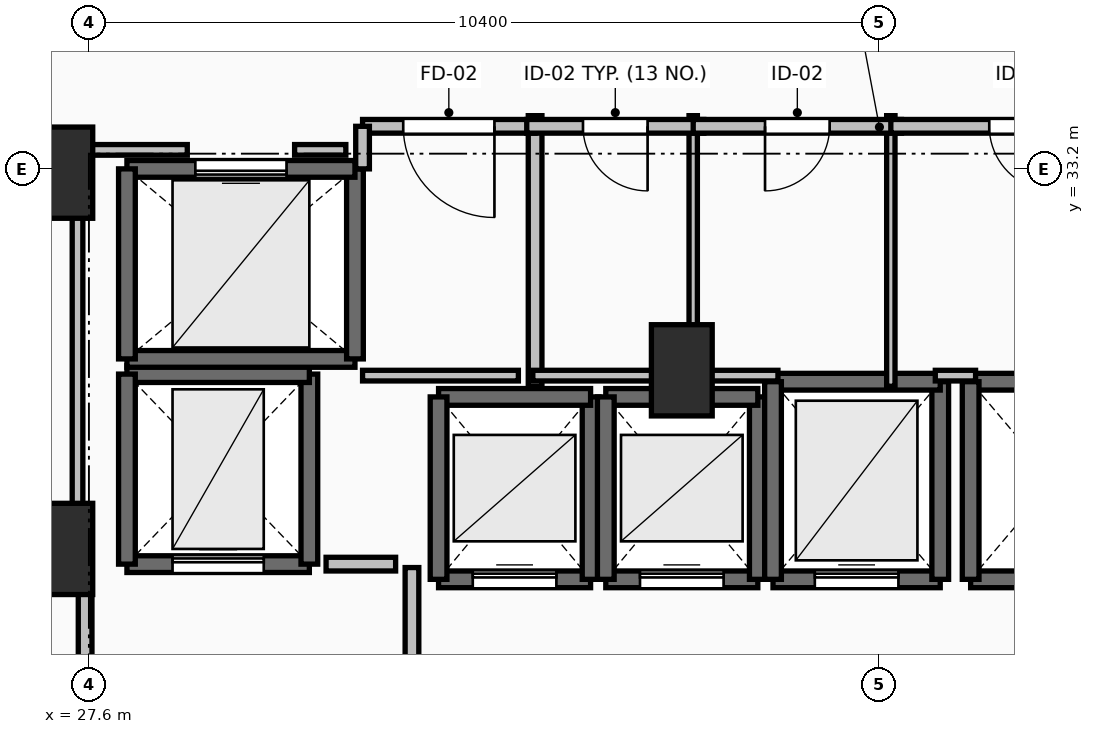
"""IFC4 building model, lengths in metres.
Left out: names, types, materials, properties, quantities, classifications, styles, units other than length and angle.
Written with IfcOpenShell. Run it as: python <this file> out.ifc"""

import sys

from ifc_helpers import new_model, si_unit, direction, frame, frame_2d, origin, origin_2d, place, context, subcontext, project, spatial, rectangle, extrude, element, fill, save


model = new_model("IFC4")
c1 = context("Model", 3, precision=1e-05, world=origin(), true_north=direction((0.0, 1.0)))
c2 = subcontext(c1, "Body", "Model", "MODEL_VIEW")
j1 = project(units=[si_unit("LENGTHUNIT", "METRE"), si_unit("PLANEANGLEUNIT", "RADIAN")], contexts=[c1])
p1 = place(None, origin())
s1 = spatial("IfcSite", under=j1, at=p1, CompositionType="ELEMENT")
p2 = place(p1, origin())
s2 = spatial("IfcBuilding", under=s1, at=p2, CompositionType="ELEMENT")
p3 = place(p2, frame((0.0, 0.0, 45.0)))
s3 = spatial("IfcBuildingStorey", under=s2, at=p3, CompositionType="ELEMENT", Elevation=45.0)
for number, where, z_axis, x_axis in (
    (1, (27.25, 28.2, 0.0), (0.0, 0.0, 1.0), (1.0, 0.0, 0.0)),
    (2, (27.25, 33.15, 0.0), (0.0, 0.0, 1.0), (1.0, 0.0, 0.0)),
    (3, (35.4, 30.55, 0.0), (0.0, 0.0, 1.0), (1.0, 0.0, 0.0)),
):
    element("IfcColumn", number, at=place(p3, frame(where, z_axis=z_axis, x_axis=x_axis)), inside=s3, PredefinedType="PILASTER", context=c2, shape_type="SweptSolid", body=[
        extrude(rectangle(XDim=0.8, YDim=1.2, at=origin_2d()), origin(), (0.0, 0.0, 1.0), 3.5),
    ])
p4 = place(p3, frame((32.2, 27.8, 0.0), z_axis=(0.0, 0.0, 1.0), x_axis=(1.0, 0.0, 0.0)))
e4 = element("IfcWall", 4, at=p4, inside=s3, PredefinedType="SOLIDWALL", context=c2, shape_type="SweptSolid", body=[
    extrude(rectangle(XDim=2.0, YDim=0.22, at=frame_2d((1.0, 0.0))), origin(), (0.0, 0.0, 1.0), 3.24),
])
p5 = place(p4, frame((0.45, 0.0, 0.0)))
e5 = element("IfcOpeningElement", 5, at=p5, cuts=e4, PredefinedType="OPENING", context=c2, shape_type="SweptSolid", body=[
    extrude(rectangle(XDim=1.1, YDim=2.2, at=frame_2d((0.55, 1.1))), frame((0.0, 0.125, 0.0), z_axis=(0.0, -1.0, 0.0), x_axis=(1.0, 0.0, 0.0)), (0.0, 0.0, 1.0), 0.25),
])
p6 = place(p3, frame((34.2, 27.8, 0.0), z_axis=(0.0, 0.0, 1.0), x_axis=(0.0, 1.0, 0.0)))
e6 = element("IfcWall", 6, at=p6, inside=s3, PredefinedType="SOLIDWALL", context=c2, shape_type="SweptSolid", body=[
    extrude(rectangle(XDim=2.4, YDim=0.22, at=frame_2d((1.2, 0.0))), origin(), (0.0, 0.0, 1.0), 3.24),
])
p7 = place(p3, frame((34.2, 30.2, 0.0), z_axis=(0.0, 0.0, 1.0), x_axis=(-1.0, 0.0, 0.0)))
e7 = element("IfcWall", 7, at=p7, inside=s3, PredefinedType="SOLIDWALL", context=c2, shape_type="SweptSolid", body=[
    extrude(rectangle(XDim=2.0, YDim=0.22, at=frame_2d((1.0, 0.0))), origin(), (0.0, 0.0, 1.0), 3.24),
])
p8 = place(p3, frame((32.2, 30.2, 0.0), z_axis=(0.0, 0.0, 1.0), x_axis=(0.0, -1.0, 0.0)))
e8 = element("IfcWall", 8, at=p8, inside=s3, PredefinedType="SOLIDWALL", context=c2, shape_type="SweptSolid", body=[
    extrude(rectangle(XDim=2.4, YDim=0.22, at=frame_2d((1.2, 0.0))), origin(), (0.0, 0.0, 1.0), 3.24),
])
p9 = place(p3, frame((34.4, 27.8, 0.0), z_axis=(0.0, 0.0, 1.0), x_axis=(1.0, 0.0, 0.0)))
e9 = element("IfcWall", 9, at=p9, inside=s3, PredefinedType="SOLIDWALL", context=c2, shape_type="SweptSolid", body=[
    extrude(rectangle(XDim=2.0, YDim=0.22, at=frame_2d((1.0, 0.0))), origin(), (0.0, 0.0, 1.0), 3.24),
])
p10 = place(p9, frame((0.45, 0.0, 0.0)))
e10 = element("IfcOpeningElement", 10, at=p10, cuts=e9, PredefinedType="OPENING", context=c2, shape_type="SweptSolid", body=[
    extrude(rectangle(XDim=1.1, YDim=2.2, at=frame_2d((0.55, 1.1))), frame((0.0, 0.125, 0.0), z_axis=(0.0, -1.0, 0.0), x_axis=(1.0, 0.0, 0.0)), (0.0, 0.0, 1.0), 0.25),
])
p11 = place(p3, frame((36.4, 27.8, 0.0), z_axis=(0.0, 0.0, 1.0), x_axis=(0.0, 1.0, 0.0)))
e11 = element("IfcWall", 11, at=p11, inside=s3, PredefinedType="SOLIDWALL", context=c2, shape_type="SweptSolid", body=[
    extrude(rectangle(XDim=2.4, YDim=0.22, at=frame_2d((1.2, 0.0))), origin(), (0.0, 0.0, 1.0), 3.24),
])
p12 = place(p3, frame((36.4, 30.2, 0.0), z_axis=(0.0, 0.0, 1.0), x_axis=(-1.0, 0.0, 0.0)))
e12 = element("IfcWall", 12, at=p12, inside=s3, PredefinedType="SOLIDWALL", context=c2, shape_type="SweptSolid", body=[
    extrude(rectangle(XDim=2.0, YDim=0.22, at=frame_2d((1.0, 0.0))), origin(), (0.0, 0.0, 1.0), 3.24),
])
p13 = place(p3, frame((34.4, 30.2, 0.0), z_axis=(0.0, 0.0, 1.0), x_axis=(0.0, -1.0, 0.0)))
e13 = element("IfcWall", 13, at=p13, inside=s3, PredefinedType="SOLIDWALL", context=c2, shape_type="SweptSolid", body=[
    extrude(rectangle(XDim=2.4, YDim=0.22, at=frame_2d((1.2, 0.0))), origin(), (0.0, 0.0, 1.0), 3.24),
])
p14 = place(p3, frame((36.6, 27.8, 0.0), z_axis=(0.0, 0.0, 1.0), x_axis=(1.0, 0.0, 0.0)))
e14 = element("IfcWall", 14, at=p14, inside=s3, PredefinedType="SOLIDWALL", context=c2, shape_type="SweptSolid", body=[
    extrude(rectangle(XDim=2.2, YDim=0.22, at=frame_2d((1.1, 0.0))), origin(), (0.0, 0.0, 1.0), 3.24),
])
p15 = place(p14, frame((0.55, 0.0, 0.0)))
e15 = element("IfcOpeningElement", 15, at=p15, cuts=e14, PredefinedType="OPENING", context=c2, shape_type="SweptSolid", body=[
    extrude(rectangle(XDim=1.1, YDim=2.2, at=frame_2d((0.55, 1.1))), frame((0.0, 0.125, 0.0), z_axis=(0.0, -1.0, 0.0), x_axis=(1.0, 0.0, 0.0)), (0.0, 0.0, 1.0), 0.25),
])
p16 = place(p3, frame((38.8, 27.8, 0.0), z_axis=(0.0, 0.0, 1.0), x_axis=(0.0, 1.0, 0.0)))
e16 = element("IfcWall", 16, at=p16, inside=s3, PredefinedType="SOLIDWALL", context=c2, shape_type="SweptSolid", body=[
    extrude(rectangle(XDim=2.6, YDim=0.22, at=frame_2d((1.3, 0.0))), origin(), (0.0, 0.0, 1.0), 3.24),
])
p17 = place(p3, frame((38.8, 30.4, 0.0), z_axis=(0.0, 0.0, 1.0), x_axis=(-1.0, 0.0, 0.0)))
e17 = element("IfcWall", 17, at=p17, inside=s3, PredefinedType="SOLIDWALL", context=c2, shape_type="SweptSolid", body=[
    extrude(rectangle(XDim=2.2, YDim=0.22, at=frame_2d((1.1, 0.0))), origin(), (0.0, 0.0, 1.0), 3.24),
])
p18 = place(p3, frame((36.6, 30.4, 0.0), z_axis=(0.0, 0.0, 1.0), x_axis=(0.0, -1.0, 0.0)))
e18 = element("IfcWall", 18, at=p18, inside=s3, PredefinedType="SOLIDWALL", context=c2, shape_type="SweptSolid", body=[
    extrude(rectangle(XDim=2.6, YDim=0.22, at=frame_2d((1.3, 0.0))), origin(), (0.0, 0.0, 1.0), 3.24),
])
for number, where, z_axis, x_axis in (
    (19, (39.2, 27.8, 0.0), (0.0, 0.0, 1.0), (1.0, 0.0, 0.0)),
    (20, (41.4, 30.4, 0.0), (0.0, 0.0, 1.0), (-1.0, 0.0, 0.0)),
):
    element("IfcWall", number, at=place(p3, frame(where, z_axis=z_axis, x_axis=x_axis)), inside=s3, PredefinedType="SOLIDWALL", context=c2, shape_type="SweptSolid", body=[
        extrude(rectangle(XDim=2.2, YDim=0.22, at=frame_2d((1.1, 0.0))), origin(), (0.0, 0.0, 1.0), 3.24),
    ])
p19 = place(p3, frame((39.2, 30.4, 0.0), z_axis=(0.0, 0.0, 1.0), x_axis=(0.0, -1.0, 0.0)))
e21 = element("IfcWall", 21, at=p19, inside=s3, PredefinedType="SOLIDWALL", context=c2, shape_type="SweptSolid", body=[
    extrude(rectangle(XDim=2.6, YDim=0.22, at=frame_2d((1.3, 0.0))), origin(), (0.0, 0.0, 1.0), 3.24),
])
p20 = place(p3, frame((28.1, 28.0, 0.0), z_axis=(0.0, 0.0, 1.0), x_axis=(1.0, 0.0, 0.0)))
e22 = element("IfcWall", 22, at=p20, inside=s3, PredefinedType="SHEAR", context=c2, shape_type="SweptSolid", body=[
    extrude(rectangle(XDim=2.4, YDim=0.22, at=frame_2d((1.2, 0.0))), origin(), (0.0, 0.0, 1.0), 3.24),
])
p21 = place(p20, frame((0.6, 0.0, 0.0)))
e23 = element("IfcOpeningElement", 23, at=p21, cuts=e22, PredefinedType="OPENING", context=c2, shape_type="SweptSolid", body=[
    extrude(rectangle(XDim=1.2, YDim=2.2, at=frame_2d((0.6, 1.1))), frame((0.0, 0.125, 0.0), z_axis=(0.0, -1.0, 0.0), x_axis=(1.0, 0.0, 0.0)), (0.0, 0.0, 1.0), 0.25),
])
p22 = place(p3, frame((30.5, 28.0, 0.0), z_axis=(0.0, 0.0, 1.0), x_axis=(0.0, 1.0, 0.0)))
e24 = element("IfcWall", 24, at=p22, inside=s3, PredefinedType="SHEAR", context=c2, shape_type="SweptSolid", body=[
    extrude(rectangle(XDim=2.5, YDim=0.22, at=frame_2d((1.25, 0.0))), origin(), (0.0, 0.0, 1.0), 3.24),
])
p23 = place(p3, frame((30.5, 30.5, 0.0), z_axis=(0.0, 0.0, 1.0), x_axis=(-1.0, 0.0, 0.0)))
e25 = element("IfcWall", 25, at=p23, inside=s3, PredefinedType="SHEAR", context=c2, shape_type="SweptSolid", body=[
    extrude(rectangle(XDim=2.4, YDim=0.22, at=frame_2d((1.2, 0.0))), origin(), (0.0, 0.0, 1.0), 3.24),
])
p24 = place(p3, frame((28.1, 30.5, 0.0), z_axis=(0.0, 0.0, 1.0), x_axis=(0.0, -1.0, 0.0)))
e26 = element("IfcWall", 26, at=p24, inside=s3, PredefinedType="SHEAR", context=c2, shape_type="SweptSolid", body=[
    extrude(rectangle(XDim=2.5, YDim=0.22, at=frame_2d((1.25, 0.0))), origin(), (0.0, 0.0, 1.0), 3.24),
])
p25 = place(p3, frame((28.1, 30.7, 0.0), z_axis=(0.0, 0.0, 1.0), x_axis=(1.0, 0.0, 0.0)))
e27 = element("IfcWall", 27, at=p25, inside=s3, PredefinedType="SOLIDWALL", context=c2, shape_type="SweptSolid", body=[
    extrude(rectangle(XDim=3.0, YDim=0.22, at=frame_2d((1.5, 0.0))), origin(), (0.0, 0.0, 1.0), 3.24),
])
p26 = place(p3, frame((31.1, 30.7, 0.0), z_axis=(0.0, 0.0, 1.0), x_axis=(0.0, 1.0, 0.0)))
e28 = element("IfcWall", 28, at=p26, inside=s3, PredefinedType="SOLIDWALL", context=c2, shape_type="SweptSolid", body=[
    extrude(rectangle(XDim=2.5, YDim=0.22, at=frame_2d((1.25, 0.0))), origin(), (0.0, 0.0, 1.0), 3.24),
])
p27 = place(p3, frame((31.1, 33.2, 0.0), z_axis=(0.0, 0.0, 1.0), x_axis=(-1.0, 0.0, 0.0)))
e29 = element("IfcWall", 29, at=p27, inside=s3, PredefinedType="SOLIDWALL", context=c2, shape_type="SweptSolid", body=[
    extrude(rectangle(XDim=3.0, YDim=0.22, at=frame_2d((1.5, 0.0))), origin(), (0.0, 0.0, 1.0), 3.24),
])
p28 = place(p27, frame((0.9, 0.0, 0.0)))
e30 = element("IfcOpeningElement", 30, at=p28, cuts=e29, PredefinedType="OPENING", context=c2, shape_type="SweptSolid", body=[
    extrude(rectangle(XDim=1.2, YDim=2.2, at=frame_2d((0.6, 1.1))), frame((0.0, 0.125, 0.0), z_axis=(0.0, -1.0, 0.0), x_axis=(1.0, 0.0, 0.0)), (0.0, 0.0, 1.0), 0.25),
])
p29 = place(p3, frame((28.1, 33.2, 0.0), z_axis=(0.0, 0.0, 1.0), x_axis=(0.0, -1.0, 0.0)))
e31 = element("IfcWall", 31, at=p29, inside=s3, PredefinedType="SOLIDWALL", context=c2, shape_type="SweptSolid", body=[
    extrude(rectangle(XDim=2.5, YDim=0.22, at=frame_2d((1.25, 0.0))), origin(), (0.0, 0.0, 1.0), 3.24),
])
p30 = place(p3, frame((31.85, 24.045, 0.0), z_axis=(0.0, 0.0, 1.0), x_axis=(0.0, 1.0, 0.0)))
e32 = element("IfcWall", 32, at=p30, inside=s3, PredefinedType="PARTITIONING", context=c2, shape_type="SweptSolid", body=[
    extrude(rectangle(XDim=3.91, YDim=0.18, at=frame_2d((1.955, 0.0))), origin(), (0.0, 0.0, 1.0), 3.24),
])
p31 = place(p30, frame((1.355, 0.0, 0.0)))
e33 = element("IfcOpeningElement", 33, at=p31, cuts=e32, PredefinedType="OPENING", context=c2, shape_type="SweptSolid", body=[
    extrude(rectangle(XDim=1.2, YDim=2.15, at=frame_2d((0.6, 1.075))), frame((0.0, 0.105, 0.0), z_axis=(0.0, -1.0, 0.0), x_axis=(1.0, 0.0, 0.0)), (0.0, 0.0, 1.0), 0.21),
])
p32 = place(p3, frame((27.55, 28.0, 0.0), z_axis=(0.0, 0.0, 1.0), x_axis=(0.0, -1.0, 0.0)))
e34 = element("IfcWall", 34, at=p32, inside=s3, PredefinedType="PARTITIONING", context=c2, shape_type="SweptSolid", body=[
    extrude(rectangle(XDim=4.05, YDim=0.18, at=frame_2d((2.025, 0.0))), origin(), (0.0, 0.0, 1.0), 3.24),
])
p33 = place(p32, frame((1.425, 0.0, 0.0)))
e35 = element("IfcOpeningElement", 35, at=p33, cuts=e34, PredefinedType="OPENING", context=c2, shape_type="SweptSolid", body=[
    extrude(rectangle(XDim=1.2, YDim=2.15, at=frame_2d((0.6, 1.075))), frame((0.0, 0.105, 0.0), z_axis=(0.0, -1.0, 0.0), x_axis=(1.0, 0.0, 0.0)), (0.0, 0.0, 1.0), 0.21),
])
p34 = place(p3, frame((33.47, 30.34, 0.0), z_axis=(0.0, 0.0, 1.0), x_axis=(0.0, 1.0, 0.0)))
e36 = element("IfcWall", 36, at=p34, inside=s3, PredefinedType="PARTITIONING", context=c2, shape_type="SweptSolid", body=[
    extrude(rectangle(XDim=3.56, YDim=0.18, at=frame_2d((1.78, 0.0))), origin(), (0.0, 0.0, 1.0), 3.24),
])
p35 = place(p3, frame((33.47, 33.76, 0.0), z_axis=(0.0, 0.0, 1.0), x_axis=(-1.0, 0.0, 0.0)))
e37 = element("IfcWall", 37, at=p35, inside=s3, PredefinedType="PARTITIONING", context=c2, shape_type="SweptSolid", body=[
    extrude(rectangle(XDim=2.27, YDim=0.18, at=frame_2d((1.135, 0.0))), origin(), (0.0, 0.0, 1.0), 3.24),
])
p36 = place(p35, frame((0.535, 0.0, 0.0)))
e38 = element("IfcOpeningElement", 38, at=p36, cuts=e37, PredefinedType="OPENING", context=c2, shape_type="SweptSolid", body=[
    extrude(rectangle(XDim=1.2, YDim=2.15, at=frame_2d((0.6, 1.075))), frame((0.0, 0.105, 0.0), z_axis=(0.0, -1.0, 0.0), x_axis=(1.0, 0.0, 0.0)), (0.0, 0.0, 1.0), 0.21),
])
p37 = place(p3, frame((31.2, 33.76, 0.0), z_axis=(0.0, 0.0, 1.0), x_axis=(0.0, -1.0, 0.0)))
e39 = element("IfcWall", 39, at=p37, inside=s3, PredefinedType="PARTITIONING", context=c2, shape_type="SweptSolid", body=[
    extrude(rectangle(XDim=0.56, YDim=0.18, at=frame_2d((0.28, 0.0))), origin(), (0.0, 0.0, 1.0), 3.24),
])
p38 = place(p3, frame((35.55, 30.34, 0.0), z_axis=(0.0, 0.0, 1.0), x_axis=(0.0, 1.0, 0.0)))
e40 = element("IfcWall", 40, at=p38, inside=s3, PredefinedType="PARTITIONING", context=c2, shape_type="SweptSolid", body=[
    extrude(rectangle(XDim=3.56, YDim=0.11, at=frame_2d((1.78, 0.0))), origin(), (0.0, 0.0, 1.0), 2.432),
])
p39 = place(p3, frame((35.69, 33.76, 0.0), z_axis=(0.0, 0.0, 1.0), x_axis=(-1.0, 0.0, 0.0)))
e41 = element("IfcWall", 41, at=p39, inside=s3, PredefinedType="PARTITIONING", context=c2, shape_type="SweptSolid", body=[
    extrude(rectangle(XDim=2.33, YDim=0.18, at=frame_2d((1.165, 0.0))), origin(), (0.0, 0.0, 1.0), 3.24),
])
p40 = place(p39, frame((0.74, 0.0, 0.0)))
e42 = element("IfcOpeningElement", 42, at=p40, cuts=e41, PredefinedType="OPENING", context=c2, shape_type="SweptSolid", body=[
    extrude(rectangle(XDim=0.85, YDim=2.1, at=frame_2d((0.425, 1.05))), frame((0.0, 0.105, 0.0), z_axis=(0.0, -1.0, 0.0), x_axis=(1.0, 0.0, 0.0)), (0.0, 0.0, 1.0), 0.21),
])
p41 = place(p3, frame((38.15, 30.34, 0.0), z_axis=(0.0, 0.0, 1.0), x_axis=(0.0, 1.0, 0.0)))
e43 = element("IfcWall", 43, at=p41, inside=s3, PredefinedType="PARTITIONING", context=c2, shape_type="SweptSolid", body=[
    extrude(rectangle(XDim=3.56, YDim=0.11, at=frame_2d((1.78, 0.0))), origin(), (0.0, 0.0, 1.0), 2.432),
])
p42 = place(p3, frame((38.29, 33.76, 0.0), z_axis=(0.0, 0.0, 1.0), x_axis=(-1.0, 0.0, 0.0)))
e44 = element("IfcWall", 44, at=p42, inside=s3, PredefinedType="PARTITIONING", context=c2, shape_type="SweptSolid", body=[
    extrude(rectangle(XDim=2.74, YDim=0.18, at=frame_2d((1.37, 0.0))), origin(), (0.0, 0.0, 1.0), 3.24),
])
p43 = place(p42, frame((0.945, 0.0, 0.0)))
e45 = element("IfcOpeningElement", 45, at=p43, cuts=e44, PredefinedType="OPENING", context=c2, shape_type="SweptSolid", body=[
    extrude(rectangle(XDim=0.85, YDim=2.1, at=frame_2d((0.425, 1.05))), frame((0.0, 0.105, 0.0), z_axis=(0.0, -1.0, 0.0), x_axis=(1.0, 0.0, 0.0)), (0.0, 0.0, 1.0), 0.21),
])
p44 = place(p3, frame((41.59, 33.76, 0.0), z_axis=(0.0, 0.0, 1.0), x_axis=(-1.0, 0.0, 0.0)))
e46 = element("IfcWall", 46, at=p44, inside=s3, PredefinedType="PARTITIONING", context=c2, shape_type="SweptSolid", body=[
    extrude(rectangle(XDim=3.44, YDim=0.18, at=frame_2d((1.72, 0.0))), origin(), (0.0, 0.0, 1.0), 3.24),
])
p45 = place(p44, frame((1.295, 0.0, 0.0)))
e47 = element("IfcOpeningElement", 47, at=p45, cuts=e46, PredefinedType="OPENING", context=c2, shape_type="SweptSolid", body=[
    extrude(rectangle(XDim=0.85, YDim=2.1, at=frame_2d((0.425, 1.05))), frame((0.0, 0.105, 0.0), z_axis=(0.0, -1.0, 0.0), x_axis=(1.0, 0.0, 0.0)), (0.0, 0.0, 1.0), 0.21),
])
p46 = place(p3, frame((31.635, 28.0, 0.0), z_axis=(0.0, 0.0, 1.0), x_axis=(-1.0, 0.0, 0.0)))
e48 = element("IfcWall", 48, at=p46, inside=s3, PredefinedType="PARTITIONING", context=c2, shape_type="SweptSolid", body=[
    extrude(rectangle(XDim=0.915, YDim=0.18, at=frame_2d((0.458, 0.0))), origin(), (0.0, 0.0, 1.0), 3.24),
])
p47 = place(p3, frame((31.2, 30.48, 0.0), z_axis=(0.0, 0.0, 1.0), x_axis=(1.0, 0.0, 0.0)))
e49 = element("IfcWall", 49, at=p47, inside=s3, PredefinedType="PARTITIONING", context=c2, shape_type="SweptSolid", body=[
    extrude(rectangle(XDim=2.05, YDim=0.14, at=frame_2d((1.025, 0.0))), origin(), (0.0, 0.0, 1.0), 3.24),
])
p48 = place(p3, frame((33.44, 30.48, 0.0), z_axis=(0.0, 0.0, 1.0), x_axis=(1.0, 0.0, 0.0)))
e50 = element("IfcWall", 50, at=p48, inside=s3, PredefinedType="PARTITIONING", context=c2, shape_type="SweptSolid", body=[
    extrude(rectangle(XDim=2.14, YDim=0.14, at=frame_2d((1.07, 0.0))), origin(), (0.0, 0.0, 1.0), 2.432),
])
p49 = place(p3, frame((35.6, 30.48, 0.0), z_axis=(0.0, 0.0, 1.0), x_axis=(1.0, 0.0, 0.0)))
e51 = element("IfcWall", 51, at=p49, inside=s3, PredefinedType="PARTITIONING", context=c2, shape_type="SweptSolid", body=[
    extrude(rectangle(XDim=1.065, YDim=0.14, at=frame_2d((0.532, 0.0))), origin(), (0.0, 0.0, 1.0), 2.432),
])
p50 = place(p3, frame((38.735, 30.48, 0.0), z_axis=(0.0, 0.0, 1.0), x_axis=(1.0, 0.0, 0.0)))
e52 = element("IfcWall", 52, at=p50, inside=s3, PredefinedType="PARTITIONING", context=c2, shape_type="SweptSolid", body=[
    extrude(rectangle(XDim=0.53, YDim=0.14, at=frame_2d((0.265, 0.0))), origin(), (0.0, 0.0, 1.0), 2.432),
])
p51 = place(p3, frame((27.45, 28.196, 0.0), z_axis=(0.0, 0.0, 1.0), x_axis=(0.0, 1.0, 0.0)))
e53 = element("IfcWall", 53, at=p51, inside=s3, PredefinedType="PARTITIONING", context=c2, shape_type="SweptSolid", body=[
    extrude(rectangle(XDim=5.254, YDim=0.14, at=frame_2d((2.627, 0.0))), origin(), (0.0, 0.0, 1.0), 2.432),
])
p52 = place(p3, frame((27.45, 33.45, 0.0), z_axis=(0.0, 0.0, 1.0), x_axis=(1.0, 0.0, 0.0)))
e54 = element("IfcWall", 54, at=p52, inside=s3, PredefinedType="PARTITIONING", context=c2, shape_type="SweptSolid", body=[
    extrude(rectangle(XDim=1.444, YDim=0.14, at=frame_2d((0.722, 0.0))), origin(), (0.0, 0.0, 1.0), 2.432),
])
p53 = place(p3, frame((30.306, 33.45, 0.0), z_axis=(0.0, 0.0, 1.0), x_axis=(1.0, 0.0, 0.0)))
e55 = element("IfcWall", 55, at=p53, inside=s3, PredefinedType="PARTITIONING", context=c2, shape_type="SweptSolid", body=[
    extrude(rectangle(XDim=0.674, YDim=0.14, at=frame_2d((0.337, 0.0))), origin(), (0.0, 0.0, 1.0), 3.24),
])
p54 = place(p5, origin())
e56 = element("IfcDoor", 56, at=p54, inside=s3, OperationType="SLIDING_TO_LEFT", PredefinedType="DOOR", context=c2, shape_type="SweptSolid", body=[
    extrude(rectangle(XDim=1.1, YDim=2.2, at=frame_2d((0.55, 1.1))), frame((0.0, 0.025, 0.0), z_axis=(0.0, -1.0, 0.0), x_axis=(1.0, 0.0, 0.0)), (0.0, 0.0, 1.0), 0.05),
])
fill(e5, e56)
p55 = place(p10, origin())
e57 = element("IfcDoor", 57, at=p55, inside=s3, OperationType="SLIDING_TO_LEFT", PredefinedType="DOOR", context=c2, shape_type="SweptSolid", body=[
    extrude(rectangle(XDim=1.1, YDim=2.2, at=frame_2d((0.55, 1.1))), frame((0.0, 0.025, 0.0), z_axis=(0.0, -1.0, 0.0), x_axis=(1.0, 0.0, 0.0)), (0.0, 0.0, 1.0), 0.05),
])
fill(e10, e57)
p56 = place(p15, origin())
e58 = element("IfcDoor", 58, at=p56, inside=s3, OperationType="SLIDING_TO_LEFT", PredefinedType="DOOR", context=c2, shape_type="SweptSolid", body=[
    extrude(rectangle(XDim=1.1, YDim=2.2, at=frame_2d((0.55, 1.1))), frame((0.0, 0.025, 0.0), z_axis=(0.0, -1.0, 0.0), x_axis=(1.0, 0.0, 0.0)), (0.0, 0.0, 1.0), 0.05),
])
fill(e15, e58)
p57 = place(p21, origin())
e59 = element("IfcDoor", 59, at=p57, inside=s3, OperationType="SLIDING_TO_LEFT", PredefinedType="DOOR", context=c2, shape_type="SweptSolid", body=[
    extrude(rectangle(XDim=1.2, YDim=2.2, at=frame_2d((0.6, 1.1))), frame((0.0, 0.025, 0.0), z_axis=(0.0, -1.0, 0.0), x_axis=(1.0, 0.0, 0.0)), (0.0, 0.0, 1.0), 0.05),
])
fill(e23, e59)
p58 = place(p28, origin())
e60 = element("IfcDoor", 60, at=p58, inside=s3, OperationType="SLIDING_TO_LEFT", PredefinedType="DOOR", context=c2, shape_type="SweptSolid", body=[
    extrude(rectangle(XDim=1.2, YDim=2.2, at=frame_2d((0.6, 1.1))), frame((0.0, 0.025, 0.0), z_axis=(0.0, -1.0, 0.0), x_axis=(1.0, 0.0, 0.0)), (0.0, 0.0, 1.0), 0.05),
])
fill(e30, e60)
p59 = place(p36, origin())
e61 = element("IfcDoor", 61, at=p59, inside=s3, OperationType="SINGLE_SWING_LEFT", PredefinedType="DOOR", context=c2, shape_type="SweptSolid", body=[
    extrude(rectangle(XDim=1.2, YDim=2.15, at=frame_2d((0.6, 1.075))), frame((0.0, 0.025, 0.0), z_axis=(0.0, -1.0, 0.0), x_axis=(1.0, 0.0, 0.0)), (0.0, 0.0, 1.0), 0.05),
])
fill(e38, e61)
p60 = place(p40, origin())
e62 = element("IfcDoor", 62, at=p60, inside=s3, OperationType="SINGLE_SWING_LEFT", PredefinedType="DOOR", context=c2, shape_type="SweptSolid", body=[
    extrude(rectangle(XDim=0.85, YDim=2.1, at=frame_2d((0.425, 1.05))), frame((0.0, 0.025, 0.0), z_axis=(0.0, -1.0, 0.0), x_axis=(1.0, 0.0, 0.0)), (0.0, 0.0, 1.0), 0.05),
])
fill(e42, e62)
p61 = place(p43, origin())
e63 = element("IfcDoor", 63, at=p61, inside=s3, OperationType="SINGLE_SWING_RIGHT", PredefinedType="DOOR", context=c2, shape_type="SweptSolid", body=[
    extrude(rectangle(XDim=0.85, YDim=2.1, at=frame_2d((0.425, 1.05))), frame((0.0, 0.025, 0.0), z_axis=(0.0, -1.0, 0.0), x_axis=(1.0, 0.0, 0.0)), (0.0, 0.0, 1.0), 0.05),
])
fill(e45, e63)
p62 = place(p45, origin())
e64 = element("IfcDoor", 64, at=p62, inside=s3, OperationType="SINGLE_SWING_LEFT", PredefinedType="DOOR", context=c2, shape_type="SweptSolid", body=[
    extrude(rectangle(XDim=0.85, YDim=2.1, at=frame_2d((0.425, 1.05))), frame((0.0, 0.025, 0.0), z_axis=(0.0, -1.0, 0.0), x_axis=(1.0, 0.0, 0.0)), (0.0, 0.0, 1.0), 0.05),
])
fill(e47, e64)
save(model, sys.argv[1])
